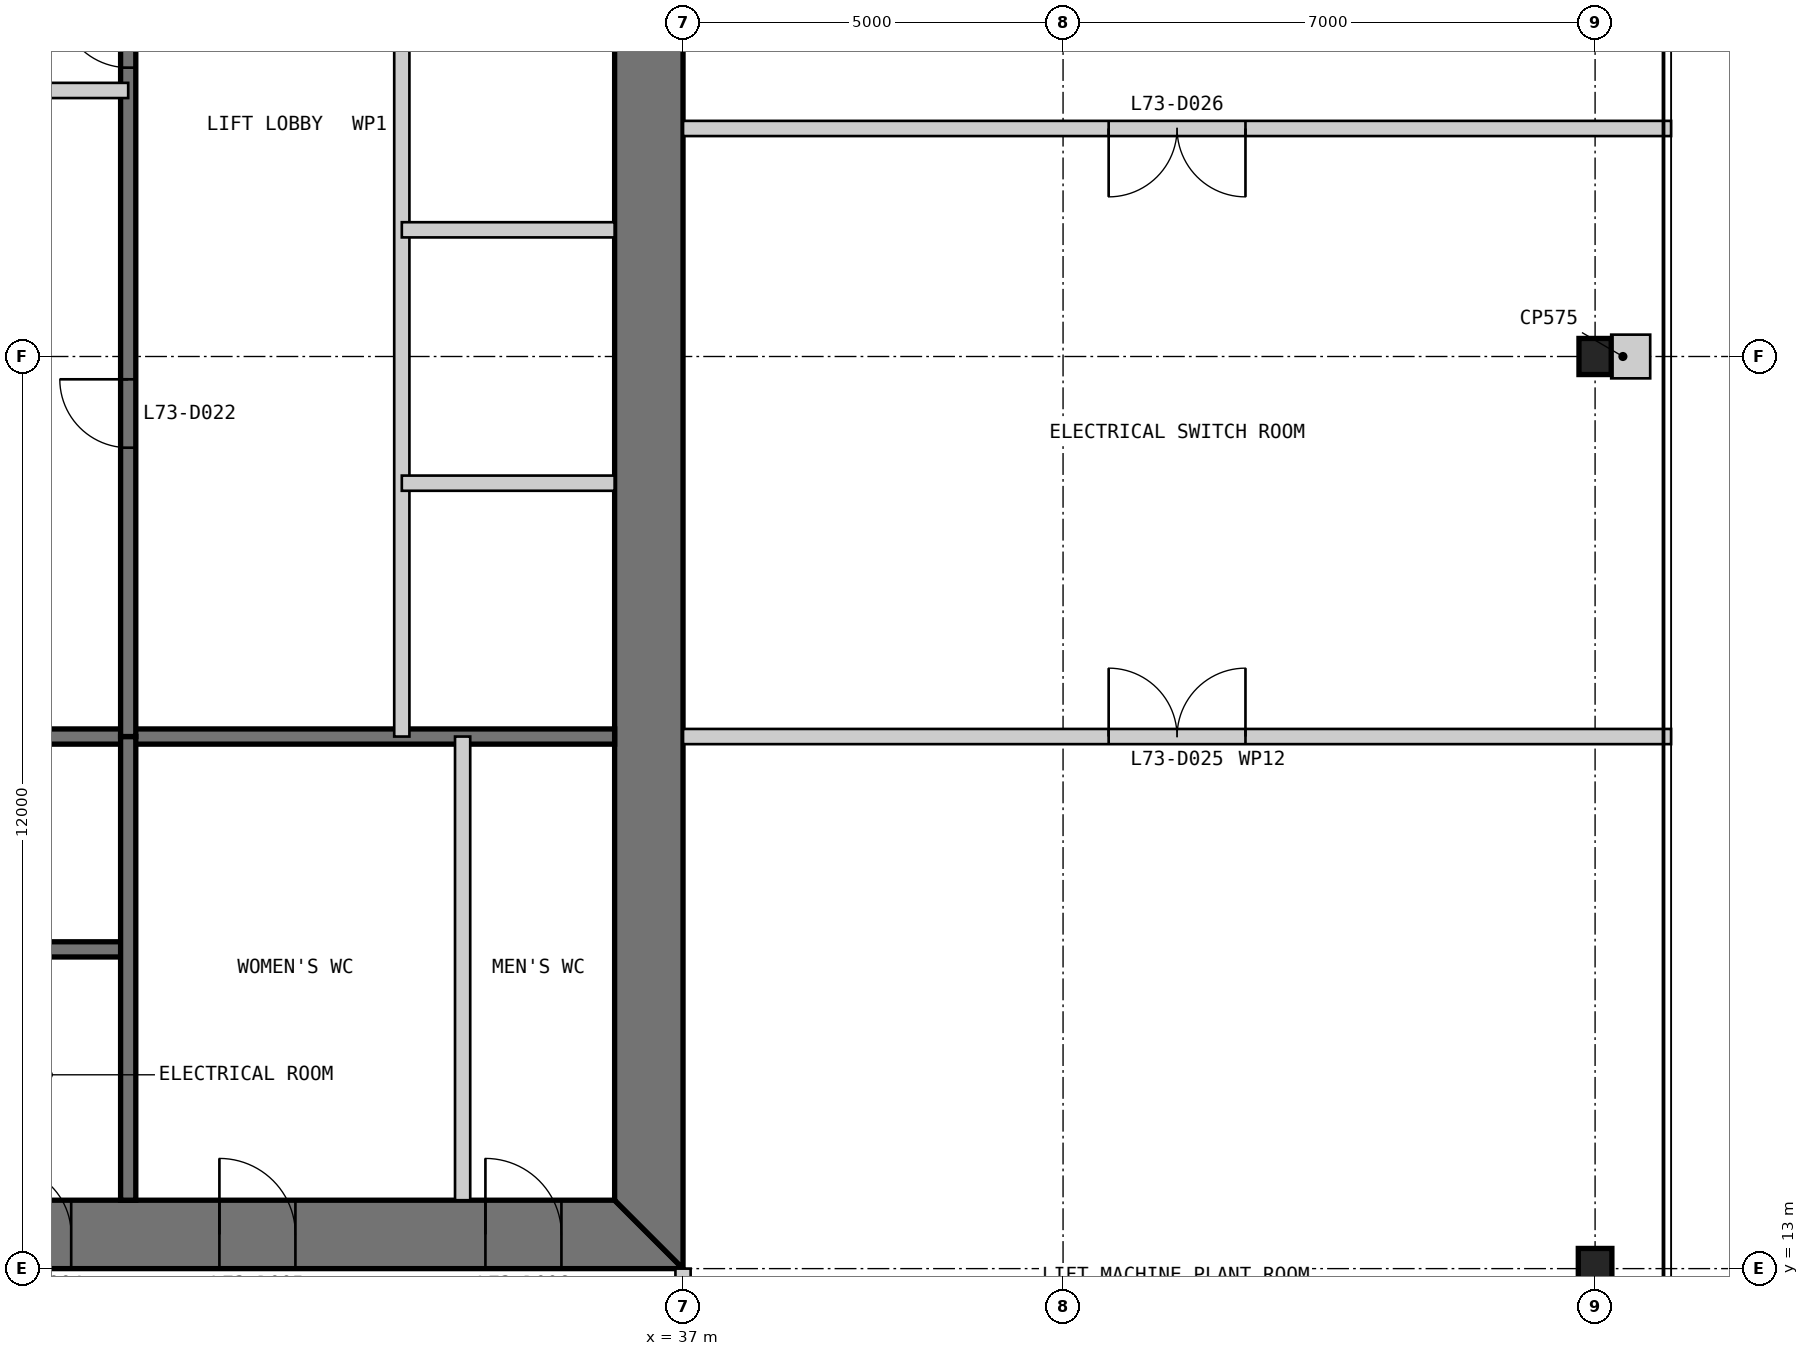
"""IFC4 building model, lengths in metres.
Left out: names, types, materials, properties, quantities, classifications, styles, units other than length and angle.
Written with IfcOpenShell. Run it as: python <this file> out.ifc"""

import sys

from ifc_helpers import new_model, si_unit, direction, frame, frame_2d, origin, origin_2d, place, context, subcontext, project, spatial, polyline, rectangle, i_section, outline, extrude, element, fill, save


model = new_model("IFC4")
c1 = context("Model", 3, precision=1e-05, world=origin(), true_north=direction((0.0, 1.0)))
c2 = subcontext(c1, "Body", "Model", "MODEL_VIEW")
j1 = project(units=[si_unit("LENGTHUNIT", "METRE"), si_unit("PLANEANGLEUNIT", "RADIAN")], contexts=[c1])
p1 = place(None, origin())
s1 = spatial("IfcSite", under=j1, at=p1, CompositionType="ELEMENT")
p2 = place(p1, origin())
s2 = spatial("IfcBuilding", under=s1, at=p2, CompositionType="ELEMENT")
p3 = place(p2, frame((0.0, 0.0, 301.8)))
s3 = spatial("IfcBuildingStorey", under=s2, at=p3, CompositionType="ELEMENT", Elevation=301.8)
p4 = place(p3, frame((49.0, 13.0, 0.0), z_axis=(0.0, 0.0, 1.0), x_axis=(1.0, 0.0, 0.0)))
e1 = element("IfcColumn", 1, at=p4, inside=s3, PredefinedType="COLUMN", context=c2, shape_type="SweptSolid", body=[
    extrude(i_section(OverallWidth=0.442, OverallDepth=0.531, WebThickness=0.066, FlangeThickness=0.106, at=origin_2d()), origin(), (0.0, 0.0, 1.0), 6.0),
])
p5 = place(p3, frame((49.0, 25.0, 0.0), z_axis=(0.0, 0.0, 1.0), x_axis=(1.0, 0.0, 0.0)))
e2 = element("IfcColumn", 2, at=p5, inside=s3, PredefinedType="COLUMN", context=c2, shape_type="SweptSolid", body=[
    extrude(i_section(OverallWidth=0.424, OverallDepth=0.475, WebThickness=0.048, FlangeThickness=0.077, at=origin_2d()), origin(), (0.0, 0.0, 1.0), 6.0),
])
p6 = place(p3, frame((13.0, 13.45, 0.0), z_axis=(0.0, 0.0, 1.0), x_axis=(1.0, 0.0, 0.0)))
e3 = element("IfcWall", 3, at=p6, inside=s3, PredefinedType="SHEAR", context=c2, shape_type="SweptSolid", body=[
    extrude(outline(polyline([(0.0, -0.45), (24.0, -0.45), (23.1, 0.45), (0.9, 0.45), (0.0, -0.45)])), origin(), (0.0, 0.0, 1.0), 6.0),
])
p7 = place(p6, frame((4.9, 0.0, 0.0)))
e4 = element("IfcOpeningElement", 4, at=p7, cuts=e3, PredefinedType="OPENING", context=c2, shape_type="SweptSolid", body=[
    extrude(rectangle(XDim=1.0, YDim=2.2, at=frame_2d((0.5, 1.1))), frame((0.0, 0.46, 0.0), z_axis=(0.0, -1.0, 0.0), x_axis=(1.0, 0.0, 0.0)), (0.0, 0.0, 1.0), 0.92),
])
p8 = place(p6, frame((8.9, 0.0, 0.0)))
e5 = element("IfcOpeningElement", 5, at=p8, cuts=e3, PredefinedType="OPENING", context=c2, shape_type="SweptSolid", body=[
    extrude(rectangle(XDim=1.1, YDim=2.2, at=frame_2d((0.55, 1.1))), frame((0.0, 0.46, 0.0), z_axis=(0.0, -1.0, 0.0), x_axis=(1.0, 0.0, 0.0)), (0.0, 0.0, 1.0), 0.92),
])
p9 = place(p6, frame((15.05, 0.0, 0.0)))
e6 = element("IfcOpeningElement", 6, at=p9, cuts=e3, PredefinedType="OPENING", context=c2, shape_type="SweptSolid", body=[
    extrude(rectangle(XDim=0.9, YDim=2.2, at=frame_2d((0.45, 1.1))), frame((0.0, 0.46, 0.0), z_axis=(0.0, -1.0, 0.0), x_axis=(1.0, 0.0, 0.0)), (0.0, 0.0, 1.0), 0.92),
])
p10 = place(p6, frame((17.9, 0.0, 0.0)))
e7 = element("IfcOpeningElement", 7, at=p10, cuts=e3, PredefinedType="OPENING", context=c2, shape_type="SweptSolid", body=[
    extrude(rectangle(XDim=1.0, YDim=2.2, at=frame_2d((0.5, 1.1))), frame((0.0, 0.46, 0.0), z_axis=(0.0, -1.0, 0.0), x_axis=(1.0, 0.0, 0.0)), (0.0, 0.0, 1.0), 0.92),
])
p11 = place(p6, frame((21.4, 0.0, 0.0)))
e8 = element("IfcOpeningElement", 8, at=p11, cuts=e3, PredefinedType="OPENING", context=c2, shape_type="SweptSolid", body=[
    extrude(rectangle(XDim=1.0, YDim=2.2, at=frame_2d((0.5, 1.1))), frame((0.0, 0.46, 0.0), z_axis=(0.0, -1.0, 0.0), x_axis=(1.0, 0.0, 0.0)), (0.0, 0.0, 1.0), 0.92),
])
p12 = place(p3, frame((36.55, 13.9, 0.0), z_axis=(0.0, 0.0, 1.0), x_axis=(0.0, 1.0, 0.0)))
e9 = element("IfcWall", 9, at=p12, inside=s3, PredefinedType="SHEAR", context=c2, shape_type="SweptSolid", body=[
    extrude(outline(polyline([(-0.9, -0.45), (23.1, -0.45), (22.2, 0.45), (0.0, 0.45), (-0.9, -0.45)])), origin(), (0.0, 0.0, 1.0), 6.0),
])
p13 = place(p12, frame((20.2, 0.0, 0.0)))
e10 = element("IfcOpeningElement", 10, at=p13, cuts=e9, PredefinedType="OPENING", context=c2, shape_type="SweptSolid", body=[
    extrude(rectangle(XDim=1.0, YDim=2.2, at=frame_2d((0.5, 1.1))), frame((0.0, 0.46, 0.0), z_axis=(0.0, -1.0, 0.0), x_axis=(1.0, 0.0, 0.0)), (0.0, 0.0, 1.0), 0.92),
])
p14 = place(p12, frame((17.25, 0.0, 0.0)))
e11 = element("IfcOpeningElement", 11, at=p14, cuts=e9, PredefinedType="OPENING", context=c2, shape_type="SweptSolid", body=[
    extrude(rectangle(XDim=0.9, YDim=2.2, at=frame_2d((0.45, 1.1))), frame((0.0, 0.46, 0.0), z_axis=(0.0, -1.0, 0.0), x_axis=(1.0, 0.0, 0.0)), (0.0, 0.0, 1.0), 0.92),
])
p15 = place(p3, frame((20.3, 17.2, 0.0), z_axis=(0.0, 0.0, 1.0), x_axis=(1.0, 0.0, 0.0)))
e12 = element("IfcWall", 12, at=p15, inside=s3, PredefinedType="SOLIDWALL", context=c2, shape_type="SweptSolid", body=[
    extrude(rectangle(XDim=9.4, YDim=0.2, at=frame_2d((4.7, 0.0))), origin(), (0.0, 0.0, 1.0), 5.8),
])
p16 = place(p15, frame((0.25, 0.0, 0.0)))
e13 = element("IfcOpeningElement", 13, at=p16, cuts=e12, PredefinedType="OPENING", context=c2, shape_type="SweptSolid", body=[
    extrude(rectangle(XDim=1.0, YDim=2.2, at=frame_2d((0.5, 1.1))), frame((0.0, 0.11, 0.0), z_axis=(0.0, -1.0, 0.0), x_axis=(1.0, 0.0, 0.0)), (0.0, 0.0, 1.0), 0.22),
])
p17 = place(p3, frame((20.3, 20.0, 0.0), z_axis=(0.0, 0.0, 1.0), x_axis=(1.0, 0.0, 0.0)))
e14 = element("IfcWall", 14, at=p17, inside=s3, PredefinedType="SOLIDWALL", context=c2, shape_type="SweptSolid", body=[
    extrude(rectangle(XDim=15.8, YDim=0.2, at=frame_2d((7.9, 0.0))), origin(), (0.0, 0.0, 1.0), 5.8),
])
p18 = place(p3, frame((29.7, 13.9, 0.0), z_axis=(0.0, 0.0, 1.0), x_axis=(0.0, 1.0, 0.0)))
e15 = element("IfcWall", 15, at=p18, inside=s3, PredefinedType="SOLIDWALL", context=c2, shape_type="SweptSolid", body=[
    extrude(rectangle(XDim=6.1, YDim=0.2, at=frame_2d((3.05, 0.0))), origin(), (0.0, 0.0, 1.0), 5.8),
])
p19 = place(p3, frame((34.1, 13.9, 0.0), z_axis=(0.0, 0.0, 1.0), x_axis=(0.0, 1.0, 0.0)))
e16 = element("IfcWall", 16, at=p19, inside=s3, PredefinedType="PARTITIONING", context=c2, shape_type="SweptSolid", body=[
    extrude(rectangle(XDim=6.1, YDim=0.2, at=frame_2d((3.05, 0.0))), origin(), (0.0, 0.0, 1.0), 5.8),
])
p20 = place(p3, frame((33.3, 36.1, 0.0), z_axis=(0.0, 0.0, 1.0), x_axis=(0.0, -1.0, 0.0)))
e17 = element("IfcWall", 17, at=p20, inside=s3, PredefinedType="PARTITIONING", context=c2, shape_type="SweptSolid", body=[
    extrude(rectangle(XDim=16.1, YDim=0.2, at=frame_2d((8.05, 0.0))), origin(), (0.0, 0.0, 1.0), 5.8),
])
p21 = place(p3, frame((29.7, 36.1, 0.0), z_axis=(0.0, 0.0, 1.0), x_axis=(0.0, -1.0, 0.0)))
e18 = element("IfcWall", 18, at=p21, inside=s3, PredefinedType="SOLIDWALL", context=c2, shape_type="SweptSolid", body=[
    extrude(rectangle(XDim=16.1, YDim=0.2, at=frame_2d((8.05, 0.0))), origin(), (0.0, 0.0, 1.0), 5.8),
])
p22 = place(p21, frame((6.4, 0.0, 0.0)))
e19 = element("IfcOpeningElement", 19, at=p22, cuts=e18, PredefinedType="OPENING", context=c2, shape_type="SweptSolid", body=[
    extrude(rectangle(XDim=0.9, YDim=2.2, at=frame_2d((0.45, 1.1))), frame((0.0, 0.11, 0.0), z_axis=(0.0, -1.0, 0.0), x_axis=(1.0, 0.0, 0.0)), (0.0, 0.0, 1.0), 0.22),
])
p23 = place(p21, frame((11.4, 0.0, 0.0)))
e20 = element("IfcOpeningElement", 20, at=p23, cuts=e18, PredefinedType="OPENING", context=c2, shape_type="SweptSolid", body=[
    extrude(rectangle(XDim=0.9, YDim=2.2, at=frame_2d((0.45, 1.1))), frame((0.0, 0.11, 0.0), z_axis=(0.0, -1.0, 0.0), x_axis=(1.0, 0.0, 0.0)), (0.0, 0.0, 1.0), 0.22),
])
for number, where, z_axis, x_axis in (
    (21, (36.1, 26.667, 0.0), (0.0, 0.0, 1.0), (-1.0, 0.0, 0.0)),
    (22, (36.1, 23.333, 0.0), (0.0, 0.0, 1.0), (-1.0, 0.0, 0.0)),
    (23, (29.7, 28.5, 0.0), (0.0, 0.0, 1.0), (-1.0, 0.0, 0.0)),
):
    element("IfcWall", number, at=place(p3, frame(where, z_axis=z_axis, x_axis=x_axis)), inside=s3, PredefinedType="PARTITIONING", context=c2, shape_type="SweptSolid", body=[
        extrude(rectangle(XDim=2.8, YDim=0.2, at=frame_2d((1.4, 0.0))), origin(), (0.0, 0.0, 1.0), 5.8),
    ])
p24 = place(p3, frame((37.0, 10.6, 0.0), z_axis=(0.0, 0.0, 1.0), x_axis=(0.0, 1.0, 0.0)))
e24 = element("IfcWall", 24, at=p24, inside=s3, PredefinedType="PARTITIONING", context=c2, shape_type="SweptSolid", body=[
    extrude(rectangle(XDim=2.4, YDim=0.2, at=frame_2d((1.2, 0.0))), origin(), (0.0, 0.0, 1.0), 4.853),
])
p25 = place(p3, frame((37.0, 20.0, 0.0), z_axis=(0.0, 0.0, 1.0), x_axis=(1.0, 0.0, 0.0)))
e25 = element("IfcWall", 25, at=p25, inside=s3, PredefinedType="PARTITIONING", context=c2, shape_type="SweptSolid", body=[
    extrude(rectangle(XDim=13.0, YDim=0.2, at=frame_2d((6.5, 0.0))), origin(), (0.0, 0.0, 1.0), 5.8),
])
p26 = place(p25, frame((5.6, 0.0, 0.0)))
e26 = element("IfcOpeningElement", 26, at=p26, cuts=e25, PredefinedType="OPENING", context=c2, shape_type="SweptSolid", body=[
    extrude(rectangle(XDim=1.8, YDim=2.4, at=frame_2d((0.9, 1.2))), frame((0.0, 0.11, 0.0), z_axis=(0.0, -1.0, 0.0), x_axis=(1.0, 0.0, 0.0)), (0.0, 0.0, 1.0), 0.22),
])
p27 = place(p3, frame((37.0, 28.0, 0.0), z_axis=(0.0, 0.0, 1.0), x_axis=(1.0, 0.0, 0.0)))
e27 = element("IfcWall", 27, at=p27, inside=s3, PredefinedType="PARTITIONING", context=c2, shape_type="SweptSolid", body=[
    extrude(rectangle(XDim=13.0, YDim=0.2, at=frame_2d((6.5, 0.0))), origin(), (0.0, 0.0, 1.0), 5.8),
])
p28 = place(p27, frame((5.6, 0.0, 0.0)))
e28 = element("IfcOpeningElement", 28, at=p28, cuts=e27, PredefinedType="OPENING", context=c2, shape_type="SweptSolid", body=[
    extrude(rectangle(XDim=1.8, YDim=2.4, at=frame_2d((0.9, 1.2))), frame((0.0, 0.11, 0.0), z_axis=(0.0, -1.0, 0.0), x_axis=(1.0, 0.0, 0.0)), (0.0, 0.0, 1.0), 0.22),
])
p29 = place(p3, frame((49.725, 25.0, 0.0), z_axis=(0.0, 0.0, 1.0), x_axis=(-1.0, 0.0, 0.0)))
e29 = element("IfcWall", 29, at=p29, inside=s3, PredefinedType="PARTITIONING", context=c2, shape_type="SweptSolid", body=[
    extrude(rectangle(XDim=0.513, YDim=0.575, at=frame_2d((0.256, 0.0))), origin(), (0.0, 0.0, 1.0), 5.8),
])
p30 = place(p9, origin())
e30 = element("IfcDoor", 30, at=p30, inside=s3, OperationType="SINGLE_SWING_LEFT", PredefinedType="DOOR", context=c2, shape_type="SweptSolid", body=[
    extrude(rectangle(XDim=0.9, YDim=2.2, at=frame_2d((0.45, 1.1))), frame((0.0, 0.025, 0.0), z_axis=(0.0, -1.0, 0.0), x_axis=(1.0, 0.0, 0.0)), (0.0, 0.0, 1.0), 0.05),
    extrude(outline(polyline([(0.0, 0.0), (0.04, 0.0), (0.04, 2.16), (0.86, 2.16), (0.86, 0.0), (0.9, 0.0), (0.9, 2.2), (0.0, 2.2), (0.0, 0.0)])), frame((0.0, 0.3, 0.0), z_axis=(0.0, -1.0, 0.0), x_axis=(1.0, 0.0, 0.0)), (0.0, 0.0, 1.0), 0.6),
])
fill(e6, e30)
p31 = place(p10, origin())
e31 = element("IfcDoor", 31, at=p31, inside=s3, OperationType="SINGLE_SWING_LEFT", PredefinedType="DOOR", context=c2, shape_type="SweptSolid", body=[
    extrude(rectangle(XDim=1.0, YDim=2.2, at=frame_2d((0.5, 1.1))), frame((0.0, 0.025, 0.0), z_axis=(0.0, -1.0, 0.0), x_axis=(1.0, 0.0, 0.0)), (0.0, 0.0, 1.0), 0.05),
    extrude(outline(polyline([(0.0, 0.0), (0.04, 0.0), (0.04, 2.16), (0.96, 2.16), (0.96, 0.0), (1.0, 0.0), (1.0, 2.2), (0.0, 2.2), (0.0, 0.0)])), frame((0.0, 0.3, 0.0), z_axis=(0.0, -1.0, 0.0), x_axis=(1.0, 0.0, 0.0)), (0.0, 0.0, 1.0), 0.6),
])
fill(e7, e31)
p32 = place(p11, origin())
e32 = element("IfcDoor", 32, at=p32, inside=s3, OperationType="SINGLE_SWING_LEFT", PredefinedType="DOOR", context=c2, shape_type="SweptSolid", body=[
    extrude(rectangle(XDim=1.0, YDim=2.2, at=frame_2d((0.5, 1.1))), frame((0.0, 0.025, 0.0), z_axis=(0.0, -1.0, 0.0), x_axis=(1.0, 0.0, 0.0)), (0.0, 0.0, 1.0), 0.05),
    extrude(outline(polyline([(0.0, 0.0), (0.04, 0.0), (0.04, 2.16), (0.96, 2.16), (0.96, 0.0), (1.0, 0.0), (1.0, 2.2), (0.0, 2.2), (0.0, 0.0)])), frame((0.0, 0.3, 0.0), z_axis=(0.0, -1.0, 0.0), x_axis=(1.0, 0.0, 0.0)), (0.0, 0.0, 1.0), 0.6),
])
fill(e8, e32)
p33 = place(p22, frame((0.9, 0.0, 0.0), z_axis=(0.0, 0.0, 1.0), x_axis=(-1.0, 0.0, 0.0)))
e33 = element("IfcDoor", 33, at=p33, inside=s3, OperationType="SINGLE_SWING_RIGHT", PredefinedType="DOOR", context=c2, shape_type="SweptSolid", body=[
    extrude(rectangle(XDim=0.9, YDim=2.2, at=frame_2d((0.45, 1.1))), frame((0.0, 0.025, 0.0), z_axis=(0.0, -1.0, 0.0), x_axis=(1.0, 0.0, 0.0)), (0.0, 0.0, 1.0), 0.05),
])
fill(e19, e33)
p34 = place(p23, frame((0.9, 0.0, 0.0), z_axis=(0.0, 0.0, 1.0), x_axis=(-1.0, 0.0, 0.0)))
e34 = element("IfcDoor", 34, at=p34, inside=s3, OperationType="SINGLE_SWING_RIGHT", PredefinedType="DOOR", context=c2, shape_type="SweptSolid", body=[
    extrude(rectangle(XDim=0.9, YDim=2.2, at=frame_2d((0.45, 1.1))), frame((0.0, 0.025, 0.0), z_axis=(0.0, -1.0, 0.0), x_axis=(1.0, 0.0, 0.0)), (0.0, 0.0, 1.0), 0.05),
])
fill(e20, e34)
p35 = place(p26, origin())
e35 = element("IfcDoor", 35, at=p35, inside=s3, OperationType="DOUBLE_DOOR_SINGLE_SWING", PredefinedType="DOOR", context=c2, shape_type="SweptSolid", body=[
    extrude(rectangle(XDim=1.8, YDim=2.4, at=frame_2d((0.9, 1.2))), frame((0.0, 0.025, 0.0), z_axis=(0.0, -1.0, 0.0), x_axis=(1.0, 0.0, 0.0)), (0.0, 0.0, 1.0), 0.05),
])
fill(e26, e35)
p36 = place(p28, frame((1.8, 0.0, 0.0), z_axis=(0.0, 0.0, 1.0), x_axis=(-1.0, 0.0, 0.0)))
e36 = element("IfcDoor", 36, at=p36, inside=s3, OperationType="DOUBLE_DOOR_SINGLE_SWING", PredefinedType="DOOR", context=c2, shape_type="SweptSolid", body=[
    extrude(rectangle(XDim=1.8, YDim=2.4, at=frame_2d((0.9, 1.2))), frame((0.0, 0.025, 0.0), z_axis=(0.0, -1.0, 0.0), x_axis=(1.0, 0.0, 0.0)), (0.0, 0.0, 1.0), 0.05),
])
fill(e28, e36)
save(model, sys.argv[1])
